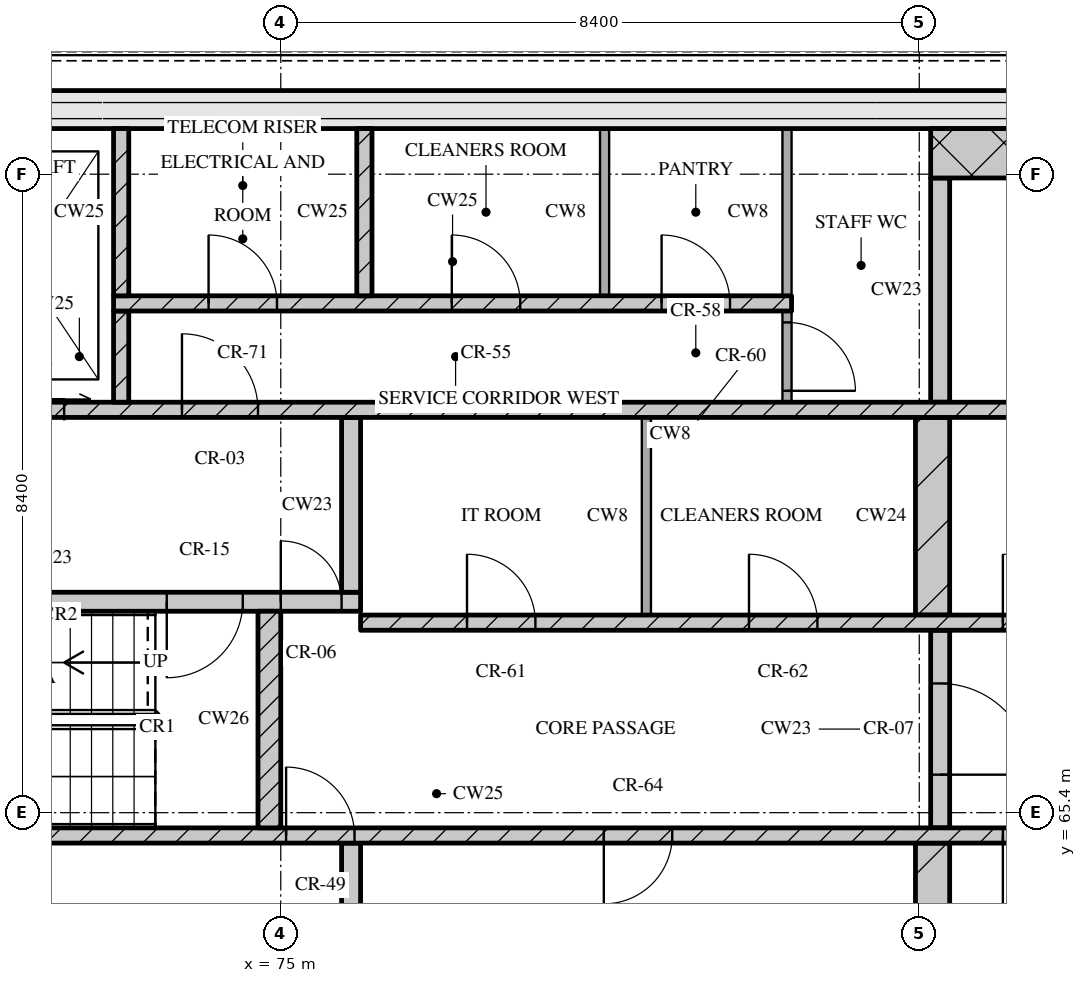
"""IFC4 building model, lengths in metres.
Left out: names, types, materials, properties, quantities, classifications, styles, units other than length and angle.
Written with IfcOpenShell. Run it as: python <this file> out.ifc"""

import sys

from ifc_helpers import new_model, si_unit, direction, frame, frame_2d, origin, place, context, subcontext, project, spatial, rectangle, extrude, element, fill, save


model = new_model("IFC4")
c1 = context("Model", 3, precision=1e-05, world=origin(), true_north=direction((0.0, 1.0)))
c2 = subcontext(c1, "Body", "Model", "MODEL_VIEW")
j1 = project(units=[si_unit("LENGTHUNIT", "METRE"), si_unit("PLANEANGLEUNIT", "RADIAN")], contexts=[c1])
p1 = place(None, origin())
s1 = spatial("IfcSite", under=j1, at=p1, CompositionType="ELEMENT")
p2 = place(p1, origin())
s2 = spatial("IfcBuilding", under=s1, at=p2, CompositionType="ELEMENT")
p3 = place(p2, frame((0.0, 0.0, 303.15)))
s3 = spatial("IfcBuildingStorey", under=s2, at=p3, CompositionType="ELEMENT", Elevation=303.15)
p4 = place(p3, frame((67.3, 74.65, 0.0), z_axis=(0.0, 0.0, 1.0), x_axis=(1.0, 0.0, 0.0)))
e1 = element("IfcWall", 1, at=p4, inside=s3, PredefinedType="SOLIDWALL", context=c2, shape_type="SweptSolid", body=[
    extrude(rectangle(XDim=40.6, YDim=0.5, at=frame_2d((20.3, 0.0))), origin(), (0.0, 0.0, 1.0), 3.32),
])
p5 = place(p3, frame((75.925, 62.4, 0.0), z_axis=(0.0, 0.0, 1.0), x_axis=(0.0, 1.0, 0.0)))
e2 = element("IfcWall", 2, at=p5, inside=s3, PredefinedType="SOLIDWALL", context=c2, shape_type="SweptSolid", body=[
    extrude(rectangle(XDim=2.6, YDim=0.25, at=frame_2d((1.3, 0.0))), origin(), (0.0, 0.0, 1.0), 3.32),
])
p6 = place(p3, frame((83.575, 62.4, 0.0), z_axis=(0.0, 0.0, 1.0), x_axis=(0.0, 1.0, 0.0)))
e3 = element("IfcWall", 3, at=p6, inside=s3, PredefinedType="SOLIDWALL", context=c2, shape_type="SweptSolid", body=[
    extrude(rectangle(XDim=2.6, YDim=0.45, at=frame_2d((1.3, 0.0))), origin(), (0.0, 0.0, 1.0), 3.32),
])
p7 = place(p3, frame((67.8, 65.1, 0.0), z_axis=(0.0, 0.0, 1.0), x_axis=(1.0, 0.0, 0.0)))
e4 = element("IfcWall", 4, at=p7, inside=s3, PredefinedType="SOLIDWALL", context=c2, shape_type="SweptSolid", body=[
    extrude(rectangle(XDim=18.5, YDim=0.2, at=frame_2d((9.25, 0.0))), origin(), (0.0, 0.0, 1.0), 3.32),
])
p8 = place(p7, frame((7.27, 0.0, 0.0)))
e5 = element("IfcOpeningElement", 5, at=p8, cuts=e4, PredefinedType="OPENING", context=c2, shape_type="SweptSolid", body=[
    extrude(rectangle(XDim=0.9, YDim=2.1, at=frame_2d((0.45, 1.05))), frame((0.0, 0.11, 0.0), z_axis=(0.0, -1.0, 0.0), x_axis=(1.0, 0.0, 0.0)), (0.0, 0.0, 1.0), 0.22),
])
p9 = place(p7, frame((11.45, 0.0, 0.0)))
e6 = element("IfcOpeningElement", 6, at=p9, cuts=e4, PredefinedType="OPENING", context=c2, shape_type="SweptSolid", body=[
    extrude(rectangle(XDim=0.9, YDim=2.1, at=frame_2d((0.45, 1.05))), frame((0.0, 0.11, 0.0), z_axis=(0.0, -1.0, 0.0), x_axis=(1.0, 0.0, 0.0)), (0.0, 0.0, 1.0), 0.22),
])
p10 = place(p7, frame((16.7, 0.0, 0.0)))
e7 = element("IfcOpeningElement", 7, at=p10, cuts=e4, PredefinedType="OPENING", context=c2, shape_type="SweptSolid", body=[
    extrude(rectangle(XDim=0.9, YDim=2.1, at=frame_2d((0.45, 1.05))), frame((0.0, 0.11, 0.0), z_axis=(0.0, -1.0, 0.0), x_axis=(1.0, 0.0, 0.0)), (0.0, 0.0, 1.0), 0.22),
])
p11 = place(p3, frame((74.85, 65.2, 0.0), z_axis=(0.0, 0.0, 1.0), x_axis=(0.0, 1.0, 0.0)))
e8 = element("IfcWall", 8, at=p11, inside=s3, PredefinedType="SOLIDWALL", context=c2, shape_type="SweptSolid", body=[
    extrude(rectangle(XDim=2.85, YDim=0.3, at=frame_2d((1.425, 0.0))), origin(), (0.0, 0.0, 1.0), 3.32),
])
p12 = place(p3, frame((83.675, 65.2, 0.0), z_axis=(0.0, 0.0, 1.0), x_axis=(0.0, 1.0, 0.0)))
e9 = element("IfcWall", 9, at=p12, inside=s3, PredefinedType="SOLIDWALL", context=c2, shape_type="SweptSolid", body=[
    extrude(rectangle(XDim=2.6, YDim=0.25, at=frame_2d((1.3, 0.0))), origin(), (0.0, 0.0, 1.0), 3.32),
])
p13 = place(p12, frame((0.7, 0.0, 0.0)))
e10 = element("IfcOpeningElement", 10, at=p13, cuts=e9, PredefinedType="OPENING", context=c2, shape_type="SweptSolid", body=[
    extrude(rectangle(XDim=1.2, YDim=2.1, at=frame_2d((0.6, 1.05))), frame((0.0, 0.135, 0.0), z_axis=(0.0, -1.0, 0.0), x_axis=(1.0, 0.0, 0.0)), (0.0, 0.0, 1.0), 0.27),
])
p14 = place(p3, frame((76.05, 67.9, 0.0), z_axis=(0.0, 0.0, 1.0), x_axis=(1.0, 0.0, 0.0)))
e11 = element("IfcWall", 11, at=p14, inside=s3, PredefinedType="SOLIDWALL", context=c2, shape_type="SweptSolid", body=[
    extrude(rectangle(XDim=23.1, YDim=0.2, at=frame_2d((11.55, 0.0))), origin(), (0.0, 0.0, 1.0), 3.32),
])
p15 = place(p14, frame((1.4, 0.0, 0.0)))
e12 = element("IfcOpeningElement", 12, at=p15, cuts=e11, PredefinedType="OPENING", context=c2, shape_type="SweptSolid", body=[
    extrude(rectangle(XDim=0.9, YDim=2.1, at=frame_2d((0.45, 1.05))), frame((0.0, 0.11, 0.0), z_axis=(0.0, -1.0, 0.0), x_axis=(1.0, 0.0, 0.0)), (0.0, 0.0, 1.0), 0.22),
])
p16 = place(p14, frame((5.11, 0.0, 0.0)))
e13 = element("IfcOpeningElement", 13, at=p16, cuts=e11, PredefinedType="OPENING", context=c2, shape_type="SweptSolid", body=[
    extrude(rectangle(XDim=0.9, YDim=2.1, at=frame_2d((0.45, 1.05))), frame((0.0, 0.11, 0.0), z_axis=(0.0, -1.0, 0.0), x_axis=(1.0, 0.0, 0.0)), (0.0, 0.0, 1.0), 0.22),
])
p17 = place(p14, frame((8.45, 0.0, 0.0)))
e14 = element("IfcOpeningElement", 14, at=p17, cuts=e11, PredefinedType="OPENING", context=c2, shape_type="SweptSolid", body=[
    extrude(rectangle(XDim=0.9, YDim=2.1, at=frame_2d((0.45, 1.05))), frame((0.0, 0.11, 0.0), z_axis=(0.0, -1.0, 0.0), x_axis=(1.0, 0.0, 0.0)), (0.0, 0.0, 1.0), 0.22),
])
p18 = place(p14, frame((10.91, 0.0, 0.0)))
e15 = element("IfcOpeningElement", 15, at=p18, cuts=e11, PredefinedType="OPENING", context=c2, shape_type="SweptSolid", body=[
    extrude(rectangle(XDim=0.9, YDim=2.1, at=frame_2d((0.45, 1.05))), frame((0.0, 0.11, 0.0), z_axis=(0.0, -1.0, 0.0), x_axis=(1.0, 0.0, 0.0)), (0.0, 0.0, 1.0), 0.22),
])
p19 = place(p14, frame((13.55, 0.0, 0.0)))
e16 = element("IfcOpeningElement", 16, at=p19, cuts=e11, PredefinedType="OPENING", context=c2, shape_type="SweptSolid", body=[
    extrude(rectangle(XDim=1.0, YDim=2.1, at=frame_2d((0.5, 1.05))), frame((0.0, 0.11, 0.0), z_axis=(0.0, -1.0, 0.0), x_axis=(1.0, 0.0, 0.0)), (0.0, 0.0, 1.0), 0.22),
])
p20 = place(p14, frame((16.2, 0.0, 0.0)))
e17 = element("IfcOpeningElement", 17, at=p20, cuts=e11, PredefinedType="OPENING", context=c2, shape_type="SweptSolid", body=[
    extrude(rectangle(XDim=1.1, YDim=2.1, at=frame_2d((0.55, 1.05))), frame((0.0, 0.11, 0.0), z_axis=(0.0, -1.0, 0.0), x_axis=(1.0, 0.0, 0.0)), (0.0, 0.0, 1.0), 0.22),
])
p21 = place(p14, frame((18.7, 0.0, 0.0)))
e18 = element("IfcOpeningElement", 18, at=p21, cuts=e11, PredefinedType="OPENING", context=c2, shape_type="SweptSolid", body=[
    extrude(rectangle(XDim=1.1, YDim=2.1, at=frame_2d((0.55, 1.05))), frame((0.0, 0.11, 0.0), z_axis=(0.0, -1.0, 0.0), x_axis=(1.0, 0.0, 0.0)), (0.0, 0.0, 1.0), 0.22),
])
p22 = place(p14, frame((21.2, 0.0, 0.0)))
e19 = element("IfcOpeningElement", 19, at=p22, cuts=e11, PredefinedType="OPENING", context=c2, shape_type="SweptSolid", body=[
    extrude(rectangle(XDim=1.1, YDim=2.1, at=frame_2d((0.55, 1.05))), frame((0.0, 0.11, 0.0), z_axis=(0.0, -1.0, 0.0), x_axis=(1.0, 0.0, 0.0)), (0.0, 0.0, 1.0), 0.22),
])
p23 = place(p3, frame((79.81, 68.0, 0.0), z_axis=(0.0, 0.0, 1.0), x_axis=(0.0, 1.0, 0.0)))
e20 = element("IfcWall", 20, at=p23, inside=s3, PredefinedType="PARTITIONING", context=c2, shape_type="SweptSolid", body=[
    extrude(rectangle(XDim=2.6, YDim=0.12, at=frame_2d((1.3, 0.0))), origin(), (0.0, 0.0, 1.0), 3.32),
])
p24 = place(p3, frame((83.575, 68.0, 0.0), z_axis=(0.0, 0.0, 1.0), x_axis=(0.0, 1.0, 0.0)))
e21 = element("IfcWall", 21, at=p24, inside=s3, PredefinedType="SOLIDWALL", context=c2, shape_type="SweptSolid", body=[
    extrude(rectangle(XDim=2.6, YDim=0.45, at=frame_2d((1.3, 0.0))), origin(), (0.0, 0.0, 1.0), 3.32),
])
p25 = place(p3, frame((67.8, 68.175, 0.0), z_axis=(0.0, 0.0, 1.0), x_axis=(1.0, 0.0, 0.0)))
e22 = element("IfcWall", 22, at=p25, inside=s3, PredefinedType="SOLIDWALL", context=c2, shape_type="SweptSolid", body=[
    extrude(rectangle(XDim=8.25, YDim=0.25, at=frame_2d((4.125, 0.0))), origin(), (0.0, 0.0, 1.0), 3.32),
])
p26 = place(p25, frame((5.7, 0.0, 0.0)))
e23 = element("IfcOpeningElement", 23, at=p26, cuts=e22, PredefinedType="OPENING", context=c2, shape_type="SweptSolid", body=[
    extrude(rectangle(XDim=1.0, YDim=2.1, at=frame_2d((0.5, 1.05))), frame((0.0, 0.135, 0.0), z_axis=(0.0, -1.0, 0.0), x_axis=(1.0, 0.0, 0.0)), (0.0, 0.0, 1.0), 0.27),
])
p27 = place(p25, frame((7.2, 0.0, 0.0)))
e24 = element("IfcOpeningElement", 24, at=p27, cuts=e22, PredefinedType="OPENING", context=c2, shape_type="SweptSolid", body=[
    extrude(rectangle(XDim=0.8, YDim=2.1, at=frame_2d((0.4, 1.05))), frame((0.0, 0.135, 0.0), z_axis=(0.0, -1.0, 0.0), x_axis=(1.0, 0.0, 0.0)), (0.0, 0.0, 1.0), 0.27),
])
p28 = place(p3, frame((75.925, 68.3, 0.0), z_axis=(0.0, 0.0, 1.0), x_axis=(0.0, 1.0, 0.0)))
e25 = element("IfcWall", 25, at=p28, inside=s3, PredefinedType="SOLIDWALL", context=c2, shape_type="SweptSolid", body=[
    extrude(rectangle(XDim=2.3, YDim=0.25, at=frame_2d((1.15, 0.0))), origin(), (0.0, 0.0, 1.0), 3.32),
])
p29 = place(p3, frame((67.8, 70.7, 0.0), z_axis=(0.0, 0.0, 1.0), x_axis=(1.0, 0.0, 0.0)))
e26 = element("IfcWall", 26, at=p29, inside=s3, PredefinedType="SOLIDWALL", context=c2, shape_type="SweptSolid", body=[
    extrude(rectangle(XDim=39.6, YDim=0.2, at=frame_2d((19.8, 0.0))), origin(), (0.0, 0.0, 1.0), 3.32),
])
p30 = place(p29, frame((0.65, 0.0, 0.0)))
e27 = element("IfcOpeningElement", 27, at=p30, cuts=e26, PredefinedType="OPENING", context=c2, shape_type="SweptSolid", body=[
    extrude(rectangle(XDim=1.1, YDim=2.1, at=frame_2d((0.55, 1.05))), frame((0.0, 0.11, 0.0), z_axis=(0.0, -1.0, 0.0), x_axis=(1.0, 0.0, 0.0)), (0.0, 0.0, 1.0), 0.22),
])
p31 = place(p29, frame((3.25, 0.0, 0.0)))
e28 = element("IfcOpeningElement", 28, at=p31, cuts=e26, PredefinedType="OPENING", context=c2, shape_type="SweptSolid", body=[
    extrude(rectangle(XDim=1.1, YDim=2.1, at=frame_2d((0.55, 1.05))), frame((0.0, 0.11, 0.0), z_axis=(0.0, -1.0, 0.0), x_axis=(1.0, 0.0, 0.0)), (0.0, 0.0, 1.0), 0.22),
])
p32 = place(p29, frame((5.9, 0.0, 0.0)))
e29 = element("IfcOpeningElement", 29, at=p32, cuts=e26, PredefinedType="OPENING", context=c2, shape_type="SweptSolid", body=[
    extrude(rectangle(XDim=1.0, YDim=2.1, at=frame_2d((0.5, 1.05))), frame((0.0, 0.11, 0.0), z_axis=(0.0, -1.0, 0.0), x_axis=(1.0, 0.0, 0.0)), (0.0, 0.0, 1.0), 0.22),
])
p33 = place(p29, frame((21.7, 0.0, 0.0)))
e30 = element("IfcOpeningElement", 30, at=p33, cuts=e26, PredefinedType="OPENING", context=c2, shape_type="SweptSolid", body=[
    extrude(rectangle(XDim=1.0, YDim=2.1, at=frame_2d((0.5, 1.05))), frame((0.0, 0.11, 0.0), z_axis=(0.0, -1.0, 0.0), x_axis=(1.0, 0.0, 0.0)), (0.0, 0.0, 1.0), 0.22),
])
p34 = place(p29, frame((32.7, 0.0, 0.0)))
e31 = element("IfcOpeningElement", 31, at=p34, cuts=e26, PredefinedType="OPENING", context=c2, shape_type="SweptSolid", body=[
    extrude(rectangle(XDim=1.0, YDim=2.1, at=frame_2d((0.5, 1.05))), frame((0.0, 0.11, 0.0), z_axis=(0.0, -1.0, 0.0), x_axis=(1.0, 0.0, 0.0)), (0.0, 0.0, 1.0), 0.22),
])
p35 = place(p29, frame((35.25, 0.0, 0.0)))
e32 = element("IfcOpeningElement", 32, at=p35, cuts=e26, PredefinedType="OPENING", context=c2, shape_type="SweptSolid", body=[
    extrude(rectangle(XDim=1.1, YDim=2.1, at=frame_2d((0.55, 1.05))), frame((0.0, 0.11, 0.0), z_axis=(0.0, -1.0, 0.0), x_axis=(1.0, 0.0, 0.0)), (0.0, 0.0, 1.0), 0.22),
])
p36 = place(p29, frame((37.85, 0.0, 0.0)))
e33 = element("IfcOpeningElement", 33, at=p36, cuts=e26, PredefinedType="OPENING", context=c2, shape_type="SweptSolid", body=[
    extrude(rectangle(XDim=1.1, YDim=2.1, at=frame_2d((0.55, 1.05))), frame((0.0, 0.11, 0.0), z_axis=(0.0, -1.0, 0.0), x_axis=(1.0, 0.0, 0.0)), (0.0, 0.0, 1.0), 0.22),
])
p37 = place(p3, frame((72.9, 70.8, 0.0), z_axis=(0.0, 0.0, 1.0), x_axis=(0.0, 1.0, 0.0)))
e34 = element("IfcWall", 34, at=p37, inside=s3, PredefinedType="SOLIDWALL", context=c2, shape_type="SweptSolid", body=[
    extrude(rectangle(XDim=1.2, YDim=0.2, at=frame_2d((0.6, 0.0))), origin(), (0.0, 0.0, 1.0), 3.32),
])
p38 = place(p3, frame((81.66, 70.8, 0.0), z_axis=(0.0, 0.0, 1.0), x_axis=(0.0, 1.0, 0.0)))
e35 = element("IfcWall", 35, at=p38, inside=s3, PredefinedType="PARTITIONING", context=c2, shape_type="SweptSolid", body=[
    extrude(rectangle(XDim=1.2, YDim=0.12, at=frame_2d((0.6, 0.0))), origin(), (0.0, 0.0, 1.0), 3.32),
])
p39 = place(p38, frame((0.15, 0.0, 0.0)))
e36 = element("IfcOpeningElement", 36, at=p39, cuts=e35, PredefinedType="OPENING", context=c2, shape_type="SweptSolid", body=[
    extrude(rectangle(XDim=0.9, YDim=2.1, at=frame_2d((0.45, 1.05))), frame((0.0, 0.07, 0.0), z_axis=(0.0, -1.0, 0.0), x_axis=(1.0, 0.0, 0.0)), (0.0, 0.0, 1.0), 0.14),
])
p40 = place(p3, frame((83.675, 70.8, 0.0), z_axis=(0.0, 0.0, 1.0), x_axis=(0.0, 1.0, 0.0)))
e37 = element("IfcWall", 37, at=p40, inside=s3, PredefinedType="SOLIDWALL", context=c2, shape_type="SweptSolid", body=[
    extrude(rectangle(XDim=2.95, YDim=0.25, at=frame_2d((1.475, 0.0))), origin(), (0.0, 0.0, 1.0), 3.32),
])
p41 = place(p3, frame((72.8, 72.1, 0.0), z_axis=(0.0, 0.0, 1.0), x_axis=(1.0, 0.0, 0.0)))
e38 = element("IfcWall", 38, at=p41, inside=s3, PredefinedType="SOLIDWALL", context=c2, shape_type="SweptSolid", body=[
    extrude(rectangle(XDim=8.92, YDim=0.2, at=frame_2d((4.46, 0.0))), origin(), (0.0, 0.0, 1.0), 3.32),
])
p42 = place(p41, frame((1.25, 0.0, 0.0)))
e39 = element("IfcOpeningElement", 39, at=p42, cuts=e38, PredefinedType="OPENING", context=c2, shape_type="SweptSolid", body=[
    extrude(rectangle(XDim=0.9, YDim=2.1, at=frame_2d((0.45, 1.05))), frame((0.0, 0.11, 0.0), z_axis=(0.0, -1.0, 0.0), x_axis=(1.0, 0.0, 0.0)), (0.0, 0.0, 1.0), 0.22),
])
p43 = place(p41, frame((4.45, 0.0, 0.0)))
e40 = element("IfcOpeningElement", 40, at=p43, cuts=e38, PredefinedType="OPENING", context=c2, shape_type="SweptSolid", body=[
    extrude(rectangle(XDim=0.9, YDim=2.1, at=frame_2d((0.45, 1.05))), frame((0.0, 0.11, 0.0), z_axis=(0.0, -1.0, 0.0), x_axis=(1.0, 0.0, 0.0)), (0.0, 0.0, 1.0), 0.22),
])
p44 = place(p41, frame((7.21, 0.0, 0.0)))
e41 = element("IfcOpeningElement", 41, at=p44, cuts=e38, PredefinedType="OPENING", context=c2, shape_type="SweptSolid", body=[
    extrude(rectangle(XDim=0.9, YDim=2.1, at=frame_2d((0.45, 1.05))), frame((0.0, 0.11, 0.0), z_axis=(0.0, -1.0, 0.0), x_axis=(1.0, 0.0, 0.0)), (0.0, 0.0, 1.0), 0.22),
])
for number, where, z_axis, x_axis in (
    (42, (72.9, 72.2, 0.0), (0.0, 0.0, 1.0), (0.0, 1.0, 0.0)),
    (43, (76.1, 72.2, 0.0), (0.0, 0.0, 1.0), (0.0, 1.0, 0.0)),
):
    element("IfcWall", number, at=place(p3, frame(where, z_axis=z_axis, x_axis=x_axis)), inside=s3, PredefinedType="SOLIDWALL", context=c2, shape_type="SweptSolid", body=[
        extrude(rectangle(XDim=2.2, YDim=0.2, at=frame_2d((1.1, 0.0))), origin(), (0.0, 0.0, 1.0), 3.32),
    ])
for number, where, z_axis, x_axis in (
    (44, (79.26, 72.2, 0.0), (0.0, 0.0, 1.0), (0.0, 1.0, 0.0)),
    (45, (81.66, 72.2, 0.0), (0.0, 0.0, 1.0), (0.0, 1.0, 0.0)),
):
    element("IfcWall", number, at=place(p3, frame(where, z_axis=z_axis, x_axis=x_axis)), inside=s3, PredefinedType="PARTITIONING", context=c2, shape_type="SweptSolid", body=[
        extrude(rectangle(XDim=2.2, YDim=0.12, at=frame_2d((1.1, 0.0))), origin(), (0.0, 0.0, 1.0), 3.32),
    ])
p45 = place(p3, frame((83.55, 74.075, 0.0), z_axis=(0.0, 0.0, 1.0), x_axis=(1.0, 0.0, 0.0)))
e46 = element("IfcWall", 46, at=p45, inside=s3, PredefinedType="SOLIDWALL", context=c2, shape_type="SweptSolid", body=[
    extrude(rectangle(XDim=8.1, YDim=0.65, at=frame_2d((4.05, 0.0))), origin(), (0.0, 0.0, 1.0), 3.32),
])
p46 = place(p8, origin())
e47 = element("IfcDoor", 47, at=p46, inside=s3, OperationType="SINGLE_SWING_LEFT", PredefinedType="DOOR", context=c2, shape_type="SweptSolid", body=[
    extrude(rectangle(XDim=0.9, YDim=2.1, at=frame_2d((0.45, 1.05))), frame((0.0, 0.025, 0.0), z_axis=(0.0, -1.0, 0.0), x_axis=(1.0, 0.0, 0.0)), (0.0, 0.0, 1.0), 0.05),
])
fill(e5, e47)
p47 = place(p9, origin())
e48 = element("IfcDoor", 48, at=p47, inside=s3, OperationType="SINGLE_SWING_RIGHT", PredefinedType="DOOR", context=c2, shape_type="SweptSolid", body=[
    extrude(rectangle(XDim=0.9, YDim=2.1, at=frame_2d((0.45, 1.05))), frame((0.0, 0.025, 0.0), z_axis=(0.0, -1.0, 0.0), x_axis=(1.0, 0.0, 0.0)), (0.0, 0.0, 1.0), 0.05),
])
fill(e6, e48)
p48 = place(p10, origin())
e49 = element("IfcDoor", 49, at=p48, inside=s3, OperationType="SINGLE_SWING_RIGHT", PredefinedType="DOOR", context=c2, shape_type="SweptSolid", body=[
    extrude(rectangle(XDim=0.9, YDim=2.1, at=frame_2d((0.45, 1.05))), frame((0.0, 0.025, 0.0), z_axis=(0.0, -1.0, 0.0), x_axis=(1.0, 0.0, 0.0)), (0.0, 0.0, 1.0), 0.05),
])
fill(e7, e49)
p49 = place(p13, origin())
e50 = element("IfcDoor", 50, at=p49, inside=s3, OperationType="SINGLE_SWING_RIGHT", PredefinedType="DOOR", context=c2, shape_type="SweptSolid", body=[
    extrude(rectangle(XDim=1.2, YDim=2.1, at=frame_2d((0.6, 1.05))), frame((0.0, 0.025, 0.0), z_axis=(0.0, -1.0, 0.0), x_axis=(1.0, 0.0, 0.0)), (0.0, 0.0, 1.0), 0.05),
])
fill(e10, e50)
p50 = place(p15, origin())
e51 = element("IfcDoor", 51, at=p50, inside=s3, OperationType="SINGLE_SWING_LEFT", PredefinedType="DOOR", context=c2, shape_type="SweptSolid", body=[
    extrude(rectangle(XDim=0.9, YDim=2.1, at=frame_2d((0.45, 1.05))), frame((0.0, 0.025, 0.0), z_axis=(0.0, -1.0, 0.0), x_axis=(1.0, 0.0, 0.0)), (0.0, 0.0, 1.0), 0.05),
])
fill(e12, e51)
p51 = place(p16, origin())
e52 = element("IfcDoor", 52, at=p51, inside=s3, OperationType="SINGLE_SWING_LEFT", PredefinedType="DOOR", context=c2, shape_type="SweptSolid", body=[
    extrude(rectangle(XDim=0.9, YDim=2.1, at=frame_2d((0.45, 1.05))), frame((0.0, 0.025, 0.0), z_axis=(0.0, -1.0, 0.0), x_axis=(1.0, 0.0, 0.0)), (0.0, 0.0, 1.0), 0.05),
])
fill(e13, e52)
p52 = place(p17, origin())
e53 = element("IfcDoor", 53, at=p52, inside=s3, OperationType="SINGLE_SWING_LEFT", PredefinedType="DOOR", context=c2, shape_type="SweptSolid", body=[
    extrude(rectangle(XDim=0.9, YDim=2.1, at=frame_2d((0.45, 1.05))), frame((0.0, 0.025, 0.0), z_axis=(0.0, -1.0, 0.0), x_axis=(1.0, 0.0, 0.0)), (0.0, 0.0, 1.0), 0.05),
])
fill(e14, e53)
p53 = place(p26, origin())
e54 = element("IfcDoor", 54, at=p53, inside=s3, OperationType="SINGLE_SWING_RIGHT", PredefinedType="DOOR", context=c2, shape_type="SweptSolid", body=[
    extrude(rectangle(XDim=1.0, YDim=2.1, at=frame_2d((0.5, 1.05))), frame((0.0, 0.025, 0.0), z_axis=(0.0, -1.0, 0.0), x_axis=(1.0, 0.0, 0.0)), (0.0, 0.0, 1.0), 0.05),
])
fill(e23, e54)
p54 = place(p27, origin())
e55 = element("IfcDoor", 55, at=p54, inside=s3, OperationType="SINGLE_SWING_LEFT", PredefinedType="DOOR", context=c2, shape_type="SweptSolid", body=[
    extrude(rectangle(XDim=0.8, YDim=2.1, at=frame_2d((0.4, 1.05))), frame((0.0, 0.025, 0.0), z_axis=(0.0, -1.0, 0.0), x_axis=(1.0, 0.0, 0.0)), (0.0, 0.0, 1.0), 0.05),
])
fill(e24, e55)
p55 = place(p31, origin())
e56 = element("IfcDoor", 56, at=p55, inside=s3, OperationType="SLIDING_TO_RIGHT", PredefinedType="DOOR", context=c2, shape_type="SweptSolid", body=[
    extrude(rectangle(XDim=1.1, YDim=2.1, at=frame_2d((0.55, 1.05))), frame((0.0, 0.025, 0.0), z_axis=(0.0, -1.0, 0.0), x_axis=(1.0, 0.0, 0.0)), (0.0, 0.0, 1.0), 0.05),
])
fill(e28, e56)
p56 = place(p32, origin())
e57 = element("IfcDoor", 57, at=p56, inside=s3, OperationType="SINGLE_SWING_LEFT", PredefinedType="DOOR", context=c2, shape_type="SweptSolid", body=[
    extrude(rectangle(XDim=1.0, YDim=2.1, at=frame_2d((0.5, 1.05))), frame((0.0, 0.025, 0.0), z_axis=(0.0, -1.0, 0.0), x_axis=(1.0, 0.0, 0.0)), (0.0, 0.0, 1.0), 0.05),
])
fill(e29, e57)
p57 = place(p39, origin())
e58 = element("IfcDoor", 58, at=p57, inside=s3, OperationType="SINGLE_SWING_RIGHT", PredefinedType="DOOR", context=c2, shape_type="SweptSolid", body=[
    extrude(rectangle(XDim=0.9, YDim=2.1, at=frame_2d((0.45, 1.05))), frame((0.0, 0.025, 0.0), z_axis=(0.0, -1.0, 0.0), x_axis=(1.0, 0.0, 0.0)), (0.0, 0.0, 1.0), 0.05),
])
fill(e36, e58)
p58 = place(p42, origin())
e59 = element("IfcDoor", 59, at=p58, inside=s3, OperationType="SINGLE_SWING_LEFT", PredefinedType="DOOR", context=c2, shape_type="SweptSolid", body=[
    extrude(rectangle(XDim=0.9, YDim=2.1, at=frame_2d((0.45, 1.05))), frame((0.0, 0.025, 0.0), z_axis=(0.0, -1.0, 0.0), x_axis=(1.0, 0.0, 0.0)), (0.0, 0.0, 1.0), 0.05),
])
fill(e39, e59)
p59 = place(p43, origin())
e60 = element("IfcDoor", 60, at=p59, inside=s3, OperationType="SINGLE_SWING_LEFT", PredefinedType="DOOR", context=c2, shape_type="SweptSolid", body=[
    extrude(rectangle(XDim=0.9, YDim=2.1, at=frame_2d((0.45, 1.05))), frame((0.0, 0.025, 0.0), z_axis=(0.0, -1.0, 0.0), x_axis=(1.0, 0.0, 0.0)), (0.0, 0.0, 1.0), 0.05),
])
fill(e40, e60)
p60 = place(p44, origin())
e61 = element("IfcDoor", 61, at=p60, inside=s3, OperationType="SINGLE_SWING_LEFT", PredefinedType="DOOR", context=c2, shape_type="SweptSolid", body=[
    extrude(rectangle(XDim=0.9, YDim=2.1, at=frame_2d((0.45, 1.05))), frame((0.0, 0.025, 0.0), z_axis=(0.0, -1.0, 0.0), x_axis=(1.0, 0.0, 0.0)), (0.0, 0.0, 1.0), 0.05),
])
fill(e41, e61)
save(model, sys.argv[1])
